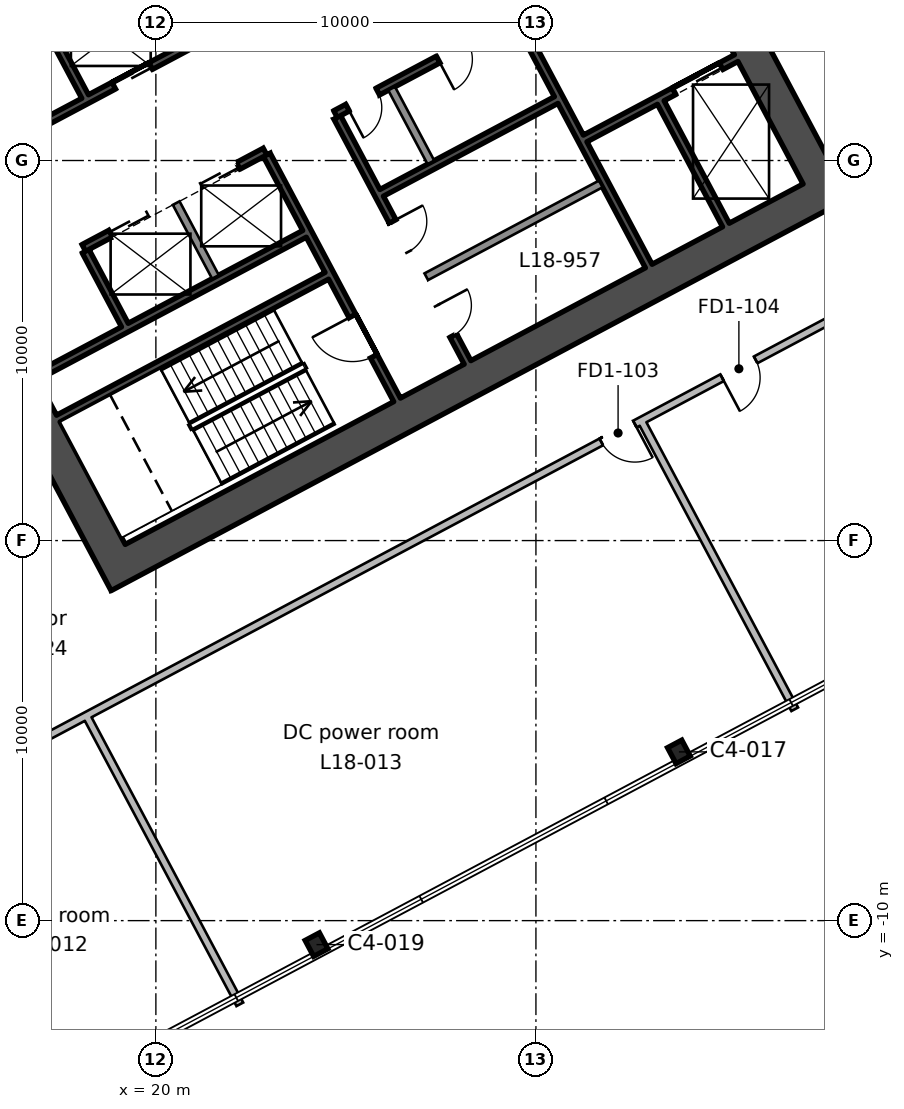
"""IFC4 building model, lengths in metres.
Left out: names, types, materials, properties, quantities, classifications, styles, units other than length and angle.
Written with IfcOpenShell. Run it as: python <this file> out.ifc"""

import sys

from ifc_helpers import new_model, si_unit, direction, frame, frame_2d, origin, origin_2d, place, context, subcontext, project, spatial, rectangle, i_section, extrude, element, fill, save


model = new_model("IFC4")
c1 = context("Model", 3, precision=1e-05, world=origin(), true_north=direction((0.0, 1.0)))
c2 = subcontext(c1, "Body", "Model", "MODEL_VIEW")
j1 = project(units=[si_unit("LENGTHUNIT", "METRE"), si_unit("PLANEANGLEUNIT", "RADIAN")], contexts=[c1])
p1 = place(None, origin())
s1 = spatial("IfcSite", under=j1, at=p1, CompositionType="ELEMENT")
p2 = place(p1, origin())
s2 = spatial("IfcBuilding", under=s1, at=p2, CompositionType="ELEMENT")
p3 = place(p2, frame((0.0, 0.0, 93.8)))
s3 = spatial("IfcBuildingStorey", under=s2, at=p3, CompositionType="ELEMENT", Elevation=93.8)
for number, where, z_axis, x_axis in (
    (1, (24.227, -10.631, 0.0), (0.0, 0.0, 1.0), (0.883, 0.469, 0.0)),
    (2, (33.762, -5.56, 0.0), (0.0, 0.0, 1.0), (0.883, 0.469, 0.0)),
):
    element("IfcColumn", number, at=place(p3, frame(where, z_axis=z_axis, x_axis=x_axis)), inside=s3, PredefinedType="COLUMN", context=c2, shape_type="SweptSolid", body=[
        extrude(i_section(OverallWidth=0.424, OverallDepth=0.475, WebThickness=0.048, FlangeThickness=0.077, FilletRadius=0.015, at=origin_2d()), origin(), (0.0, 0.0, 1.0), 4.6),
    ])
p4 = place(p3, frame((19.219, -1.107, 0.0), z_axis=(0.0, 0.0, 1.0), x_axis=(-0.46947084998, 0.882947971864, 0.0)))
e3 = element("IfcWall", 3, at=p4, inside=s3, PredefinedType="SHEAR", context=c2, shape_type="SweptSolid", body=[
    extrude(rectangle(XDim=20.0, YDim=0.9, at=frame_2d((10.0, 0.0))), origin(), (0.0, 0.0, 1.0), 4.6),
])
p5 = place(p4, frame((7.0, 0.0, 0.0)))
e4 = element("IfcOpeningElement", 4, at=p5, cuts=e3, PredefinedType="OPENING", context=c2, shape_type="SweptSolid", body=[
    extrude(rectangle(XDim=2.4, YDim=2.4, at=frame_2d((1.2, 1.2))), frame((0.0, 0.46, 0.0), z_axis=(0.0, -1.0, 0.0), x_axis=(1.0, 0.0, 0.0)), (0.0, 0.0, 1.0), 0.92),
])
p6 = place(p3, frame((37.849, 8.799, 0.0), z_axis=(0.0, 0.0, 1.0), x_axis=(-0.469465789982, 0.882950662289, 0.0)))
e5 = element("IfcWall", 5, at=p6, inside=s3, PredefinedType="SHEAR", context=c2, shape_type="SweptSolid", body=[
    extrude(rectangle(XDim=20.0, YDim=0.9, at=frame_2d((10.0, 0.0))), origin(), (0.0, 0.0, 1.0), 4.6),
])
p7 = place(p6, frame((10.6, 0.0, 0.0)))
e6 = element("IfcOpeningElement", 6, at=p7, cuts=e5, PredefinedType="OPENING", context=c2, shape_type="SweptSolid", body=[
    extrude(rectangle(XDim=2.4, YDim=2.4, at=frame_2d((1.2, 1.2))), frame((0.0, 0.46, 0.0), z_axis=(0.0, -1.0, 0.0), x_axis=(1.0, 0.0, 0.0)), (0.0, 0.0, 1.0), 0.92),
])
p8 = place(p3, frame((19.405, -0.498, 0.0), z_axis=(0.0, 0.0, 1.0), x_axis=(0.88294509198, 0.469476266226, 0.0)))
e7 = element("IfcWall", 7, at=p8, inside=s3, PredefinedType="SHEAR", context=c2, shape_type="SweptSolid", body=[
    extrude(rectangle(XDim=20.2, YDim=0.9, at=frame_2d((10.1, 0.0))), origin(), (0.0, 0.0, 1.0), 4.6),
])
p9 = place(p3, frame((19.184, 5.67, 0.0), z_axis=(0.0, 0.0, 1.0), x_axis=(-0.4694473164, 0.882960484464, 0.0)))
e8 = element("IfcWall", 8, at=p9, inside=s3, PredefinedType="SHEAR", context=c2, shape_type="SweptSolid", body=[
    extrude(rectangle(XDim=2.2, YDim=0.2, at=frame_2d((1.1, 0.0))), origin(), (0.0, 0.0, 1.0), 4.6),
])
p10 = place(p3, frame((18.138, 11.683, 0.0), z_axis=(0.0, 0.0, 1.0), x_axis=(-0.469480409012, 0.88294288918, 0.0)))
e9 = element("IfcWall", 9, at=p10, inside=s3, PredefinedType="SHEAR", context=c2, shape_type="SweptSolid", body=[
    extrude(rectangle(XDim=7.3, YDim=0.2, at=frame_2d((3.65, 0.0))), origin(), (0.0, 0.0, 1.0), 4.6),
])
p11 = place(p3, frame((21.568, 6.938, 0.0), z_axis=(0.0, 0.0, 1.0), x_axis=(-0.469533832133, 0.882914480843, 0.0)))
e10 = element("IfcWall", 10, at=p11, inside=s3, PredefinedType="SOLIDWALL", context=c2, shape_type="SweptSolid", body=[
    extrude(rectangle(XDim=2.2, YDim=0.2, at=frame_2d((1.1, 0.0))), origin(), (0.0, 0.0, 1.0), 4.6),
])
p12 = place(p3, frame((26.346, 3.702, 0.0), z_axis=(0.0, 0.0, 1.0), x_axis=(-0.469480409012, 0.88294288918, 0.0)))
e11 = element("IfcWall", 11, at=p12, inside=s3, PredefinedType="SHEAR", context=c2, shape_type="SweptSolid", body=[
    extrude(rectangle(XDim=7.3, YDim=0.2, at=frame_2d((3.65, 0.0))), origin(), (0.0, 0.0, 1.0), 4.6),
])
p13 = place(p12, frame((1.3, 0.0, 0.0)))
e12 = element("IfcOpeningElement", 12, at=p13, cuts=e11, PredefinedType="OPENING", context=c2, shape_type="SweptSolid", body=[
    extrude(rectangle(XDim=1.2, YDim=2.1, at=frame_2d((0.6, 1.05))), frame((0.0, 0.11, 0.0), z_axis=(0.0, -1.0, 0.0), x_axis=(1.0, 0.0, 0.0)), (0.0, 0.0, 1.0), 0.22),
])
p14 = place(p3, frame((28.2, 4.688, 0.0), z_axis=(0.0, 0.0, 1.0), x_axis=(-0.469454336211, 0.882956752176, 0.0)))
e13 = element("IfcWall", 13, at=p14, inside=s3, PredefinedType="SHEAR", context=c2, shape_type="SweptSolid", body=[
    extrude(rectangle(XDim=7.3, YDim=0.2, at=frame_2d((3.65, 0.0))), origin(), (0.0, 0.0, 1.0), 4.6),
])
p15 = place(p14, frame((0.8, 0.0, 0.0)))
e14 = element("IfcOpeningElement", 14, at=p15, cuts=e13, PredefinedType="OPENING", context=c2, shape_type="SweptSolid", body=[
    extrude(rectangle(XDim=0.9, YDim=2.1, at=frame_2d((0.45, 1.05))), frame((0.0, 0.11, 0.0), z_axis=(0.0, -1.0, 0.0), x_axis=(1.0, 0.0, 0.0)), (0.0, 0.0, 1.0), 0.22),
])
p16 = place(p14, frame((3.3, 0.0, 0.0)))
e15 = element("IfcOpeningElement", 15, at=p16, cuts=e13, PredefinedType="OPENING", context=c2, shape_type="SweptSolid", body=[
    extrude(rectangle(XDim=0.9, YDim=2.1, at=frame_2d((0.45, 1.05))), frame((0.0, 0.11, 0.0), z_axis=(0.0, -1.0, 0.0), x_axis=(1.0, 0.0, 0.0)), (0.0, 0.0, 1.0), 0.22),
])
p17 = place(p3, frame((27.236, 9.951, 0.0), z_axis=(0.0, 0.0, 1.0), x_axis=(-0.4694473164, 0.882960484464, 0.0)))
e16 = element("IfcWall", 16, at=p17, inside=s3, PredefinedType="SOLIDWALL", context=c2, shape_type="SweptSolid", body=[
    extrude(rectangle(XDim=2.2, YDim=0.2, at=frame_2d((1.1, 0.0))), origin(), (0.0, 0.0, 1.0), 4.6),
])
p18 = place(p3, frame((32.968, 7.223, 0.0), z_axis=(0.0, 0.0, 1.0), x_axis=(-0.469480409012, 0.88294288918, 0.0)))
e17 = element("IfcWall", 17, at=p18, inside=s3, PredefinedType="SHEAR", context=c2, shape_type="SweptSolid", body=[
    extrude(rectangle(XDim=7.3, YDim=0.2, at=frame_2d((3.65, 0.0))), origin(), (0.0, 0.0, 1.0), 4.6),
])
p19 = place(p3, frame((34.999, 8.303, 0.0), z_axis=(0.0, 0.0, 1.0), x_axis=(-0.4694665462, 0.882950260207, 0.0)))
e18 = element("IfcWall", 18, at=p19, inside=s3, PredefinedType="SHEAR", context=c2, shape_type="SweptSolid", body=[
    extrude(rectangle(XDim=3.65, YDim=0.2, at=frame_2d((1.825, 0.0))), origin(), (0.0, 0.0, 1.0), 4.6),
])
p20 = place(p3, frame((27.115, 6.942, 0.0), z_axis=(0.0, 0.0, 1.0), x_axis=(0.882934506056, 0.469496174655, 0.0)))
e19 = element("IfcWall", 19, at=p20, inside=s3, PredefinedType="SOLIDWALL", context=c2, shape_type="SweptSolid", body=[
    extrude(rectangle(XDim=5.2, YDim=0.2, at=frame_2d((2.6, 0.0))), origin(), (0.0, 0.0, 1.0), 4.6),
])
p21 = place(p3, frame((17.434, 3.21, 0.0), z_axis=(0.0, 0.0, 1.0), x_axis=(0.882940221191, 0.469485426614, 0.0)))
e20 = element("IfcWall", 20, at=p21, inside=s3, PredefinedType="SHEAR", context=c2, shape_type="SweptSolid", body=[
    extrude(rectangle(XDim=8.0, YDim=0.2, at=frame_2d((4.0, 0.0))), origin(), (0.0, 0.0, 1.0), 4.6),
])
p22 = place(p3, frame((31.296, 10.581, 0.0), z_axis=(0.0, 0.0, 1.0), x_axis=(0.882960433586, 0.469447412093, 0.0)))
e21 = element("IfcWall", 21, at=p22, inside=s3, PredefinedType="SHEAR", context=c2, shape_type="SweptSolid", body=[
    extrude(rectangle(XDim=4.5, YDim=0.2, at=frame_2d((2.25, 0.0))), origin(), (0.0, 0.0, 1.0), 4.6),
])
p23 = place(p22, frame((2.65, 0.0, 0.0)))
e22 = element("IfcOpeningElement", 22, at=p23, cuts=e21, PredefinedType="OPENING", context=c2, shape_type="SweptSolid", body=[
    extrude(rectangle(XDim=1.4, YDim=2.4, at=frame_2d((0.7, 1.2))), frame((0.0, 0.11, 0.0), z_axis=(0.0, -1.0, 0.0), x_axis=(1.0, 0.0, 0.0)), (0.0, 0.0, 1.0), 0.22),
])
p24 = place(p3, frame((16.847, 4.314, 0.0), z_axis=(0.0, 0.0, 1.0), x_axis=(0.882940221191, 0.469485426614, 0.0)))
e23 = element("IfcWall", 23, at=p24, inside=s3, PredefinedType="SHEAR", context=c2, shape_type="SweptSolid", body=[
    extrude(rectangle(XDim=8.0, YDim=0.2, at=frame_2d((4.0, 0.0))), origin(), (0.0, 0.0, 1.0), 4.6),
])
p25 = place(p3, frame((25.941, 9.15, 0.0), z_axis=(0.0, 0.0, 1.0), x_axis=(0.882953967957, 0.469459572775, 0.0)))
e24 = element("IfcWall", 24, at=p25, inside=s3, PredefinedType="SHEAR", context=c2, shape_type="SweptSolid", body=[
    extrude(rectangle(XDim=5.2, YDim=0.2, at=frame_2d((2.6, 0.0))), origin(), (0.0, 0.0, 1.0), 4.6),
])
p26 = place(p3, frame((18.104, 7.701, 0.0), z_axis=(0.0, 0.0, 1.0), x_axis=(0.882952937579, 0.469461510692, 0.0)))
e25 = element("IfcWall", 25, at=p26, inside=s3, PredefinedType="SHEAR", context=c2, shape_type="SweptSolid", body=[
    extrude(rectangle(XDim=5.4, YDim=0.2, at=frame_2d((2.7, 0.0))), origin(), (0.0, 0.0, 1.0), 4.6),
])
p27 = place(p26, frame((0.8, 0.0, 0.0)))
e26 = element("IfcOpeningElement", 26, at=p27, cuts=e25, PredefinedType="OPENING", context=c2, shape_type="SweptSolid", body=[
    extrude(rectangle(XDim=1.1, YDim=2.1, at=frame_2d((0.55, 1.05))), frame((0.0, 0.11, 0.0), z_axis=(0.0, -1.0, 0.0), x_axis=(1.0, 0.0, 0.0)), (0.0, 0.0, 1.0), 0.22),
])
p28 = place(p26, frame((3.5, 0.0, 0.0)))
e27 = element("IfcOpeningElement", 27, at=p28, cuts=e25, PredefinedType="OPENING", context=c2, shape_type="SweptSolid", body=[
    extrude(rectangle(XDim=1.1, YDim=2.1, at=frame_2d((0.55, 1.05))), frame((0.0, 0.11, 0.0), z_axis=(0.0, -1.0, 0.0), x_axis=(1.0, 0.0, 0.0)), (0.0, 0.0, 1.0), 0.22),
])
p29 = place(p3, frame((24.726, 11.222, 0.0), z_axis=(0.0, 0.0, 1.0), x_axis=(0.882940221191, 0.469485426614, 0.0)))
e28 = element("IfcWall", 28, at=p29, inside=s3, PredefinedType="SHEAR", context=c2, shape_type="SweptSolid", body=[
    extrude(rectangle(XDim=10.0, YDim=0.2, at=frame_2d((5.0, 0.0))), origin(), (0.0, 0.0, 1.0), 4.6),
])
p30 = place(p29, frame((6.3, 0.0, 0.0)))
e29 = element("IfcOpeningElement", 29, at=p30, cuts=e28, PredefinedType="OPENING", context=c2, shape_type="SweptSolid", body=[
    extrude(rectangle(XDim=1.2, YDim=2.1, at=frame_2d((0.6, 1.05))), frame((0.0, 0.11, 0.0), z_axis=(0.0, -1.0, 0.0), x_axis=(1.0, 0.0, 0.0)), (0.0, 0.0, 1.0), 0.22),
])
p31 = place(p29, frame((0.36, 0.0, 0.0)))
e30 = element("IfcOpeningElement", 30, at=p31, cuts=e28, PredefinedType="OPENING", context=c2, shape_type="SweptSolid", body=[
    extrude(rectangle(XDim=0.9, YDim=2.1, at=frame_2d((0.45, 1.05))), frame((0.0, 0.11, 0.0), z_axis=(0.0, -1.0, 0.0), x_axis=(1.0, 0.0, 0.0)), (0.0, 0.0, 1.0), 0.22),
])
p32 = place(p29, frame((3.06, 0.0, 0.0)))
e31 = element("IfcOpeningElement", 31, at=p32, cuts=e28, PredefinedType="OPENING", context=c2, shape_type="SweptSolid", body=[
    extrude(rectangle(XDim=0.9, YDim=2.1, at=frame_2d((0.45, 1.05))), frame((0.0, 0.11, 0.0), z_axis=(0.0, -1.0, 0.0), x_axis=(1.0, 0.0, 0.0)), (0.0, 0.0, 1.0), 0.22),
])
p33 = place(p3, frame((14.124, 9.435, 0.0), z_axis=(0.0, 0.0, 1.0), x_axis=(0.882940221191, 0.469485426614, 0.0)))
e32 = element("IfcWall", 32, at=p33, inside=s3, PredefinedType="SHEAR", context=c2, shape_type="SweptSolid", body=[
    extrude(rectangle(XDim=10.0, YDim=0.2, at=frame_2d((5.0, 0.0))), origin(), (0.0, 0.0, 1.0), 4.6),
])
p34 = place(p33, frame((2.1, 0.0, 0.0)))
e33 = element("IfcOpeningElement", 33, at=p34, cuts=e32, PredefinedType="OPENING", context=c2, shape_type="SweptSolid", body=[
    extrude(rectangle(XDim=1.2, YDim=2.1, at=frame_2d((0.6, 1.05))), frame((0.0, 0.11, 0.0), z_axis=(0.0, -1.0, 0.0), x_axis=(1.0, 0.0, 0.0)), (0.0, 0.0, 1.0), 0.22),
])
p35 = place(p33, frame((5.4, 0.0, 0.0)))
e34 = element("IfcOpeningElement", 34, at=p35, cuts=e32, PredefinedType="OPENING", context=c2, shape_type="SweptSolid", body=[
    extrude(rectangle(XDim=1.1, YDim=2.1, at=frame_2d((0.55, 1.05))), frame((0.0, 0.11, 0.0), z_axis=(0.0, -1.0, 0.0), x_axis=(1.0, 0.0, 0.0)), (0.0, 0.0, 1.0), 0.22),
])
p36 = place(p33, frame((8.1, 0.0, 0.0)))
e35 = element("IfcOpeningElement", 35, at=p36, cuts=e32, PredefinedType="OPENING", context=c2, shape_type="SweptSolid", body=[
    extrude(rectangle(XDim=1.1, YDim=2.1, at=frame_2d((0.55, 1.05))), frame((0.0, 0.11, 0.0), z_axis=(0.0, -1.0, 0.0), x_axis=(1.0, 0.0, 0.0)), (0.0, 0.0, 1.0), 0.22),
])
p37 = place(p3, frame((18.172, -4.608, 0.0), z_axis=(0.0, 0.0, 1.0), x_axis=(0.469386979633, -0.882992561323, 0.0)))
e36 = element("IfcWall", 36, at=p37, inside=s3, PredefinedType="PARTITIONING", context=c2, shape_type="SweptSolid", body=[
    extrude(rectangle(XDim=8.6, YDim=0.2, at=frame_2d((4.3, 0.0))), origin(), (0.0, 0.0, 1.0), 4.2),
])
p38 = place(p3, frame((57.105, 16.093, 0.0), z_axis=(0.0, 0.0, 1.0), x_axis=(-0.882946553343, -0.469473517827, 0.0)))
e37 = element("IfcWall", 37, at=p38, inside=s3, PredefinedType="PARTITIONING", context=c2, shape_type="SweptSolid", body=[
    extrude(rectangle(XDim=49.272, YDim=0.2, at=frame_2d((24.636, 0.0))), origin(), (0.0, 0.0, 1.0), 4.2),
])
p39 = place(p38, frame((27.75, 0.0, 0.0)))
e38 = element("IfcOpeningElement", 38, at=p39, cuts=e37, PredefinedType="OPENING", context=c2, shape_type="SweptSolid", body=[
    extrude(rectangle(XDim=1.0, YDim=2.1, at=frame_2d((0.5, 1.05))), frame((0.0, 0.11, 0.0), z_axis=(0.0, -1.0, 0.0), x_axis=(1.0, 0.0, 0.0)), (0.0, 0.0, 1.0), 0.22),
])
p40 = place(p38, frame((24.15, 0.0, 0.0)))
e39 = element("IfcOpeningElement", 39, at=p40, cuts=e37, PredefinedType="OPENING", context=c2, shape_type="SweptSolid", body=[
    extrude(rectangle(XDim=1.0, YDim=2.1, at=frame_2d((0.5, 1.05))), frame((0.0, 0.11, 0.0), z_axis=(0.0, -1.0, 0.0), x_axis=(1.0, 0.0, 0.0)), (0.0, 0.0, 1.0), 0.22),
])
p41 = place(p38, frame((9.85, 0.0, 0.0)))
e40 = element("IfcOpeningElement", 40, at=p41, cuts=e37, PredefinedType="OPENING", context=c2, shape_type="SweptSolid", body=[
    extrude(rectangle(XDim=1.0, YDim=2.1, at=frame_2d((0.5, 1.05))), frame((0.0, 0.11, 0.0), z_axis=(0.0, -1.0, 0.0), x_axis=(1.0, 0.0, 0.0)), (0.0, 0.0, 1.0), 0.22),
])
p42 = place(p3, frame((36.809, -4.439, 0.0), z_axis=(0.0, 0.0, 1.0), x_axis=(-0.469409112223, 0.882980795579, 0.0)))
e41 = element("IfcWall", 41, at=p42, inside=s3, PredefinedType="PARTITIONING", context=c2, shape_type="SweptSolid", body=[
    extrude(rectangle(XDim=8.6, YDim=0.2, at=frame_2d((4.3, 0.0))), origin(), (0.0, 0.0, 1.0), 4.2),
])
p43 = place(p3, frame((40.013, 9.949, 0.0), z_axis=(0.0, 0.0, 1.0), x_axis=(-0.469489882812, 0.882937851685, 0.0)))
e42 = element("IfcWall", 42, at=p43, inside=s3, PredefinedType="PARTITIONING", context=c2, shape_type="SweptSolid", body=[
    extrude(rectangle(XDim=20.0, YDim=0.2, at=frame_2d((10.0, 0.0))), origin(), (0.0, 0.0, 1.0), 4.2),
])
p44 = place(p43, frame((9.55, 0.0, 0.0)))
e43 = element("IfcOpeningElement", 43, at=p44, cuts=e42, PredefinedType="OPENING", context=c2, shape_type="SweptSolid", body=[
    extrude(rectangle(XDim=1.0, YDim=2.1, at=frame_2d((0.5, 1.05))), frame((0.0, 0.11, 0.0), z_axis=(0.0, -1.0, 0.0), x_axis=(1.0, 0.0, 0.0)), (0.0, 0.0, 1.0), 0.22),
])
p45 = place(p13, origin())
e44 = element("IfcDoor", 44, at=p45, inside=s3, OperationType="SINGLE_SWING_RIGHT", PredefinedType="DOOR", context=c2, shape_type="SweptSolid", body=[
    extrude(rectangle(XDim=1.2, YDim=2.1, at=frame_2d((0.6, 1.05))), frame((0.0, 0.025, 0.0), z_axis=(0.0, -1.0, 0.0), x_axis=(1.0, 0.0, 0.0)), (0.0, 0.0, 1.0), 0.05),
])
fill(e12, e44)
p46 = place(p31, frame((0.9, 0.0, 0.0), z_axis=(0.0, 0.0, 1.0), x_axis=(-1.0, 0.0, 0.0)))
e45 = element("IfcDoor", 45, at=p46, inside=s3, OperationType="SINGLE_SWING_RIGHT", PredefinedType="DOOR", context=c2, shape_type="SweptSolid", body=[
    extrude(rectangle(XDim=0.9, YDim=2.1, at=frame_2d((0.45, 1.05))), frame((0.0, 0.025, 0.0), z_axis=(0.0, -1.0, 0.0), x_axis=(1.0, 0.0, 0.0)), (0.0, 0.0, 1.0), 0.05),
])
fill(e30, e45)
p47 = place(p32, frame((0.9, 0.0, 0.0), z_axis=(0.0, 0.0, 1.0), x_axis=(-1.0, 0.0, 0.0)))
e46 = element("IfcDoor", 46, at=p47, inside=s3, OperationType="SINGLE_SWING_RIGHT", PredefinedType="DOOR", context=c2, shape_type="SweptSolid", body=[
    extrude(rectangle(XDim=0.9, YDim=2.1, at=frame_2d((0.45, 1.05))), frame((0.0, 0.025, 0.0), z_axis=(0.0, -1.0, 0.0), x_axis=(1.0, 0.0, 0.0)), (0.0, 0.0, 1.0), 0.05),
])
fill(e31, e46)
p48 = place(p35, origin())
e47 = element("IfcDoor", 47, at=p48, inside=s3, OperationType="DOUBLE_DOOR_SLIDING", PredefinedType="DOOR", context=c2, shape_type="SweptSolid", body=[
    extrude(rectangle(XDim=1.1, YDim=2.1, at=frame_2d((0.55, 1.05))), frame((0.0, 0.025, 0.0), z_axis=(0.0, -1.0, 0.0), x_axis=(1.0, 0.0, 0.0)), (0.0, 0.0, 1.0), 0.05),
])
fill(e34, e47)
p49 = place(p27, origin())
e48 = element("IfcDoor", 48, at=p49, inside=s3, OperationType="DOUBLE_DOOR_SLIDING", PredefinedType="DOOR", context=c2, shape_type="SweptSolid", body=[
    extrude(rectangle(XDim=1.1, YDim=2.1, at=frame_2d((0.55, 1.05))), frame((0.0, 0.025, 0.0), z_axis=(0.0, -1.0, 0.0), x_axis=(1.0, 0.0, 0.0)), (0.0, 0.0, 1.0), 0.05),
])
fill(e26, e48)
p50 = place(p28, origin())
e49 = element("IfcDoor", 49, at=p50, inside=s3, OperationType="DOUBLE_DOOR_SLIDING", PredefinedType="DOOR", context=c2, shape_type="SweptSolid", body=[
    extrude(rectangle(XDim=1.1, YDim=2.1, at=frame_2d((0.55, 1.05))), frame((0.0, 0.025, 0.0), z_axis=(0.0, -1.0, 0.0), x_axis=(1.0, 0.0, 0.0)), (0.0, 0.0, 1.0), 0.05),
])
fill(e27, e49)
p51 = place(p23, origin())
e50 = element("IfcDoor", 50, at=p51, inside=s3, OperationType="DOUBLE_DOOR_SLIDING", PredefinedType="DOOR", context=c2, shape_type="SweptSolid", body=[
    extrude(rectangle(XDim=1.4, YDim=2.4, at=frame_2d((0.7, 1.2))), frame((0.0, 0.025, 0.0), z_axis=(0.0, -1.0, 0.0), x_axis=(1.0, 0.0, 0.0)), (0.0, 0.0, 1.0), 0.05),
])
fill(e22, e50)
p52 = place(p15, frame((0.9, 0.0, 0.0), z_axis=(0.0, 0.0, 1.0), x_axis=(-1.0, 0.0, 0.0)))
e51 = element("IfcDoor", 51, at=p52, inside=s3, OperationType="SINGLE_SWING_LEFT", PredefinedType="DOOR", context=c2, shape_type="SweptSolid", body=[
    extrude(rectangle(XDim=0.9, YDim=2.1, at=frame_2d((0.45, 1.05))), frame((0.0, 0.025, 0.0), z_axis=(0.0, -1.0, 0.0), x_axis=(1.0, 0.0, 0.0)), (0.0, 0.0, 1.0), 0.05),
])
fill(e14, e51)
p53 = place(p16, frame((0.9, 0.0, 0.0), z_axis=(0.0, 0.0, 1.0), x_axis=(-1.0, 0.0, 0.0)))
e52 = element("IfcDoor", 52, at=p53, inside=s3, OperationType="SINGLE_SWING_LEFT", PredefinedType="DOOR", context=c2, shape_type="SweptSolid", body=[
    extrude(rectangle(XDim=0.9, YDim=2.1, at=frame_2d((0.45, 1.05))), frame((0.0, 0.025, 0.0), z_axis=(0.0, -1.0, 0.0), x_axis=(1.0, 0.0, 0.0)), (0.0, 0.0, 1.0), 0.05),
])
fill(e15, e52)
p54 = place(p39, origin())
e53 = element("IfcDoor", 53, at=p54, inside=s3, OperationType="SINGLE_SWING_LEFT", PredefinedType="DOOR", context=c2, shape_type="SweptSolid", body=[
    extrude(rectangle(XDim=1.0, YDim=2.1, at=frame_2d((0.5, 1.05))), frame((0.0, 0.025, 0.0), z_axis=(0.0, -1.0, 0.0), x_axis=(1.0, 0.0, 0.0)), (0.0, 0.0, 1.0), 0.05),
])
fill(e38, e53)
p55 = place(p40, origin())
e54 = element("IfcDoor", 54, at=p55, inside=s3, OperationType="SINGLE_SWING_RIGHT", PredefinedType="DOOR", context=c2, shape_type="SweptSolid", body=[
    extrude(rectangle(XDim=1.0, YDim=2.1, at=frame_2d((0.5, 1.05))), frame((0.0, 0.025, 0.0), z_axis=(0.0, -1.0, 0.0), x_axis=(1.0, 0.0, 0.0)), (0.0, 0.0, 1.0), 0.05),
])
fill(e39, e54)
save(model, sys.argv[1])
